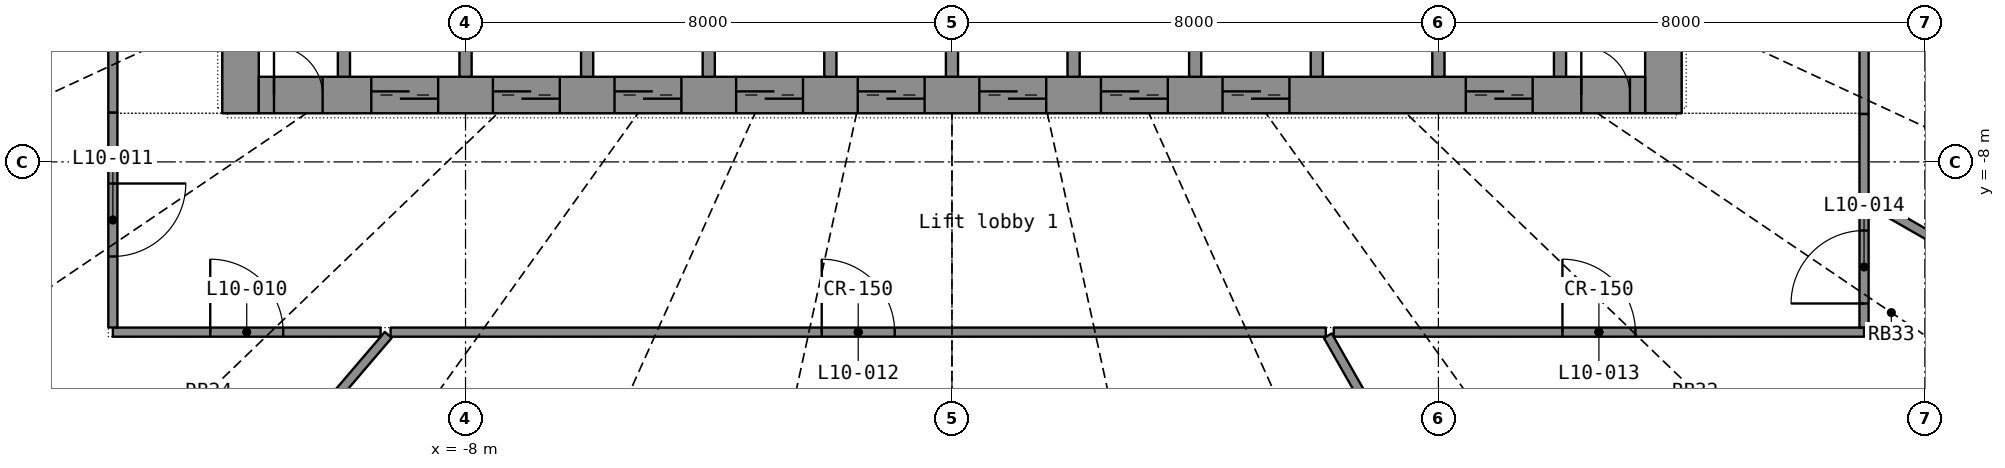
"""IFC4 building model, lengths in metres.
Left out: names, types, materials, properties, quantities, classifications, styles, units other than length and angle.
Written with IfcOpenShell. Run it as: python <this file> out.ifc"""

import sys

from ifc_helpers import new_model, si_unit, direction, frame, frame_2d, origin, place, context, subcontext, project, spatial, rectangle, extrude, element, fill, save


model = new_model("IFC4")
c1 = context("Model", 3, precision=1e-05, world=origin(), true_north=direction((0.0, 1.0)))
c2 = subcontext(c1, "Body", "Model", "MODEL_VIEW")
j1 = project(units=[si_unit("LENGTHUNIT", "METRE"), si_unit("PLANEANGLEUNIT", "RADIAN")], contexts=[c1])
p1 = place(None, origin())
s1 = spatial("IfcSite", under=j1, at=p1, CompositionType="ELEMENT")
p2 = place(p1, origin())
s2 = spatial("IfcBuilding", under=s1, at=p2, CompositionType="ELEMENT")
p3 = place(p2, frame((0.0, 0.0, 48.2)))
s3 = spatial("IfcBuildingStorey", under=s2, at=p3, CompositionType="ELEMENT", Elevation=48.2)
p4 = place(p3, frame((-11.7, -7.2, 0.0), z_axis=(0.0, 0.0, 1.0), x_axis=(0.0, 1.0, 0.0)))
e1 = element("IfcWall", 1, at=p4, inside=s3, PredefinedType="SHEAR", context=c2, shape_type="SweptSolid", body=[
    extrude(rectangle(XDim=14.4, YDim=0.6, at=frame_2d((7.2, 0.0))), origin(), (0.0, 0.0, 1.0), 3.3),
])
p5 = place(p4, frame((6.5, 0.0, 0.0)))
e2 = element("IfcOpeningElement", 2, at=p5, cuts=e1, PredefinedType="OPENING", context=c2, shape_type="SweptSolid", body=[
    extrude(rectangle(XDim=1.4, YDim=2.2, at=frame_2d((0.7, 1.1))), frame((0.0, 0.31, 0.0), z_axis=(0.0, -1.0, 0.0), x_axis=(1.0, 0.0, 0.0)), (0.0, 0.0, 1.0), 0.62),
])
p6 = place(p3, frame((11.7, -7.2, 0.0), z_axis=(0.0, 0.0, 1.0), x_axis=(0.0, 1.0, 0.0)))
e3 = element("IfcWall", 3, at=p6, inside=s3, PredefinedType="SHEAR", context=c2, shape_type="SweptSolid", body=[
    extrude(rectangle(XDim=14.4, YDim=0.6, at=frame_2d((7.2, 0.0))), origin(), (0.0, 0.0, 1.0), 3.3),
])
p7 = place(p6, frame((6.5, 0.0, 0.0)))
e4 = element("IfcOpeningElement", 4, at=p7, cuts=e3, PredefinedType="OPENING", context=c2, shape_type="SweptSolid", body=[
    extrude(rectangle(XDim=1.4, YDim=2.2, at=frame_2d((0.7, 1.1))), frame((0.0, 0.31, 0.0), z_axis=(0.0, -1.0, 0.0), x_axis=(1.0, 0.0, 0.0)), (0.0, 0.0, 1.0), 0.62),
])
p8 = place(p3, frame((-11.4, -6.9, 0.0), z_axis=(0.0, 0.0, 1.0), x_axis=(1.0, 0.0, 0.0)))
e5 = element("IfcWall", 5, at=p8, inside=s3, PredefinedType="SHEAR", context=c2, shape_type="SweptSolid", body=[
    extrude(rectangle(XDim=22.8, YDim=0.6, at=frame_2d((11.4, 0.0))), origin(), (0.0, 0.0, 1.0), 3.3),
])
p9 = place(p8, frame((1.85, 0.0, 0.0)))
e6 = element("IfcOpeningElement", 6, at=p9, cuts=e5, PredefinedType="OPENING", context=c2, shape_type="SweptSolid", body=[
    extrude(rectangle(XDim=1.1, YDim=2.2, at=frame_2d((0.55, 1.1))), frame((0.0, 0.31, 0.0), z_axis=(0.0, -1.0, 0.0), x_axis=(1.0, 0.0, 0.0)), (0.0, 0.0, 1.0), 0.62),
])
p10 = place(p8, frame((3.85, 0.0, 0.0)))
e7 = element("IfcOpeningElement", 7, at=p10, cuts=e5, PredefinedType="OPENING", context=c2, shape_type="SweptSolid", body=[
    extrude(rectangle(XDim=1.1, YDim=2.2, at=frame_2d((0.55, 1.1))), frame((0.0, 0.31, 0.0), z_axis=(0.0, -1.0, 0.0), x_axis=(1.0, 0.0, 0.0)), (0.0, 0.0, 1.0), 0.62),
])
p11 = place(p8, frame((5.85, 0.0, 0.0)))
e8 = element("IfcOpeningElement", 8, at=p11, cuts=e5, PredefinedType="OPENING", context=c2, shape_type="SweptSolid", body=[
    extrude(rectangle(XDim=1.1, YDim=2.2, at=frame_2d((0.55, 1.1))), frame((0.0, 0.31, 0.0), z_axis=(0.0, -1.0, 0.0), x_axis=(1.0, 0.0, 0.0)), (0.0, 0.0, 1.0), 0.62),
])
p12 = place(p8, frame((7.85, 0.0, 0.0)))
e9 = element("IfcOpeningElement", 9, at=p12, cuts=e5, PredefinedType="OPENING", context=c2, shape_type="SweptSolid", body=[
    extrude(rectangle(XDim=1.1, YDim=2.2, at=frame_2d((0.55, 1.1))), frame((0.0, 0.31, 0.0), z_axis=(0.0, -1.0, 0.0), x_axis=(1.0, 0.0, 0.0)), (0.0, 0.0, 1.0), 0.62),
])
p13 = place(p8, frame((9.85, 0.0, 0.0)))
e10 = element("IfcOpeningElement", 10, at=p13, cuts=e5, PredefinedType="OPENING", context=c2, shape_type="SweptSolid", body=[
    extrude(rectangle(XDim=1.1, YDim=2.2, at=frame_2d((0.55, 1.1))), frame((0.0, 0.31, 0.0), z_axis=(0.0, -1.0, 0.0), x_axis=(1.0, 0.0, 0.0)), (0.0, 0.0, 1.0), 0.62),
])
p14 = place(p8, frame((11.85, 0.0, 0.0)))
e11 = element("IfcOpeningElement", 11, at=p14, cuts=e5, PredefinedType="OPENING", context=c2, shape_type="SweptSolid", body=[
    extrude(rectangle(XDim=1.1, YDim=2.2, at=frame_2d((0.55, 1.1))), frame((0.0, 0.31, 0.0), z_axis=(0.0, -1.0, 0.0), x_axis=(1.0, 0.0, 0.0)), (0.0, 0.0, 1.0), 0.62),
])
p15 = place(p8, frame((13.85, 0.0, 0.0)))
e12 = element("IfcOpeningElement", 12, at=p15, cuts=e5, PredefinedType="OPENING", context=c2, shape_type="SweptSolid", body=[
    extrude(rectangle(XDim=1.1, YDim=2.2, at=frame_2d((0.55, 1.1))), frame((0.0, 0.31, 0.0), z_axis=(0.0, -1.0, 0.0), x_axis=(1.0, 0.0, 0.0)), (0.0, 0.0, 1.0), 0.62),
])
p16 = place(p8, frame((15.85, 0.0, 0.0)))
e13 = element("IfcOpeningElement", 13, at=p16, cuts=e5, PredefinedType="OPENING", context=c2, shape_type="SweptSolid", body=[
    extrude(rectangle(XDim=1.1, YDim=2.2, at=frame_2d((0.55, 1.1))), frame((0.0, 0.31, 0.0), z_axis=(0.0, -1.0, 0.0), x_axis=(1.0, 0.0, 0.0)), (0.0, 0.0, 1.0), 0.62),
])
p17 = place(p8, frame((19.85, 0.0, 0.0)))
e14 = element("IfcOpeningElement", 14, at=p17, cuts=e5, PredefinedType="OPENING", context=c2, shape_type="SweptSolid", body=[
    extrude(rectangle(XDim=1.1, YDim=2.2, at=frame_2d((0.55, 1.1))), frame((0.0, 0.31, 0.0), z_axis=(0.0, -1.0, 0.0), x_axis=(1.0, 0.0, 0.0)), (0.0, 0.0, 1.0), 0.62),
])
p18 = place(p8, frame((0.25, 0.0, 0.0)))
e15 = element("IfcOpeningElement", 15, at=p18, cuts=e5, PredefinedType="OPENING", context=c2, shape_type="SweptSolid", body=[
    extrude(rectangle(XDim=0.8, YDim=2.05, at=frame_2d((0.4, 1.025))), frame((0.0, 0.31, 0.0), z_axis=(0.0, -1.0, 0.0), x_axis=(1.0, 0.0, 0.0)), (0.0, 0.0, 1.0), 0.62),
])
p19 = place(p8, frame((21.75, 0.0, 0.0)))
e16 = element("IfcOpeningElement", 16, at=p19, cuts=e5, PredefinedType="OPENING", context=c2, shape_type="SweptSolid", body=[
    extrude(rectangle(XDim=0.8, YDim=2.05, at=frame_2d((0.4, 1.025))), frame((0.0, 0.31, 0.0), z_axis=(0.0, -1.0, 0.0), x_axis=(1.0, 0.0, 0.0)), (0.0, 0.0, 1.0), 0.62),
])
for number, where, z_axis, x_axis in (
    (17, (-10.0, -6.6, 0.0), (0.0, 0.0, 1.0), (0.0, 1.0, 0.0)),
    (18, (-8.0, -6.6, 0.0), (0.0, 0.0, 1.0), (0.0, 1.0, 0.0)),
    (19, (-6.0, -6.6, 0.0), (0.0, 0.0, 1.0), (0.0, 1.0, 0.0)),
    (20, (-4.0, -6.6, 0.0), (0.0, 0.0, 1.0), (0.0, 1.0, 0.0)),
    (21, (-2.0, -6.6, 0.0), (0.0, 0.0, 1.0), (0.0, 1.0, 0.0)),
    (22, (0.0, -6.6, 0.0), (0.0, 0.0, 1.0), (0.0, 1.0, 0.0)),
    (23, (2.0, -6.6, 0.0), (0.0, 0.0, 1.0), (0.0, 1.0, 0.0)),
    (24, (4.0, -6.6, 0.0), (0.0, 0.0, 1.0), (0.0, 1.0, 0.0)),
    (25, (6.0, -6.6, 0.0), (0.0, 0.0, 1.0), (0.0, 1.0, 0.0)),
    (26, (8.0, -6.6, 0.0), (0.0, 0.0, 1.0), (0.0, 1.0, 0.0)),
    (27, (10.0, -6.6, 0.0), (0.0, 0.0, 1.0), (0.0, 1.0, 0.0)),
):
    element("IfcWall", number, at=place(p3, frame(where, z_axis=z_axis, x_axis=x_axis)), inside=s3, PredefinedType="SHEAR", context=c2, shape_type="SweptSolid", body=[
        extrude(rectangle(XDim=2.7, YDim=0.2, at=frame_2d((1.35, 0.0))), origin(), (0.0, 0.0, 1.0), 3.3),
    ])
p20 = place(p3, frame((-9.232, -10.8, 0.0), z_axis=(0.0, 0.0, 1.0), x_axis=(1.0, 0.0, 0.0)))
e28 = element("IfcWall", 28, at=p20, inside=s3, PredefinedType="PARTITIONING", context=c2, shape_type="SweptSolid", body=[
    extrude(rectangle(XDim=15.381, YDim=0.15, at=frame_2d((7.69, 0.0))), origin(), (0.0, 0.0, 1.0), 2.4),
])
p21 = place(p20, frame((7.09, 0.0, 0.0)))
e29 = element("IfcOpeningElement", 29, at=p21, cuts=e28, PredefinedType="OPENING", context=c2, shape_type="SweptSolid", body=[
    extrude(rectangle(XDim=1.2, YDim=2.2, at=frame_2d((0.6, 1.1))), frame((0.0, 0.085, 0.0), z_axis=(0.0, -1.0, 0.0), x_axis=(1.0, 0.0, 0.0)), (0.0, 0.0, 1.0), 0.17),
])
p22 = place(p3, frame((-24.974, -9.539, 0.0), z_axis=(0.0, 0.0, 1.0), x_axis=(0.934173736, 0.356818485, 0.0)))
e30 = element("IfcWall", 30, at=p22, inside=s3, PredefinedType="PARTITIONING", context=c2, shape_type="SweptSolid", body=[
    extrude(rectangle(XDim=11.961, YDim=0.15, at=frame_2d((5.981, 0.0))), origin(), (0.0, 0.0, 1.0), 2.4),
])
p23 = place(p3, frame((11.639, -20.445, 0.0), z_axis=(0.0, 0.0, 1.0), x_axis=(-0.494739272, 0.869041456, 0.0)))
e31 = element("IfcWall", 31, at=p23, inside=s3, PredefinedType="PARTITIONING", context=c2, shape_type="SweptSolid", body=[
    extrude(rectangle(XDim=11.031, YDim=0.15, at=frame_2d((5.516, 0.0))), origin(), (0.0, 0.0, 1.0), 2.4),
])
p24 = place(p3, frame((-15.798, -18.48, 0.0), z_axis=(0.0, 0.0, 1.0), x_axis=(0.649794059, 0.760110308, 0.0)))
e32 = element("IfcWall", 32, at=p24, inside=s3, PredefinedType="PARTITIONING", context=c2, shape_type="SweptSolid", body=[
    extrude(rectangle(XDim=10.045, YDim=0.15, at=frame_2d((5.022, 0.0))), origin(), (0.0, 0.0, 1.0), 2.4),
])
p25 = place(p3, frame((6.279, -10.8, 0.0), z_axis=(0.0, 0.0, 1.0), x_axis=(1.0, 0.0, 0.0)))
e33 = element("IfcWall", 33, at=p25, inside=s3, PredefinedType="PARTITIONING", context=c2, shape_type="SweptSolid", body=[
    extrude(rectangle(XDim=8.721, YDim=0.15, at=frame_2d((4.36, 0.0))), origin(), (0.0, 0.0, 1.0), 2.4),
])
p26 = place(p25, frame((3.76, 0.0, 0.0)))
e34 = element("IfcOpeningElement", 34, at=p26, cuts=e33, PredefinedType="OPENING", context=c2, shape_type="SweptSolid", body=[
    extrude(rectangle(XDim=1.2, YDim=2.2, at=frame_2d((0.6, 1.1))), frame((0.0, 0.085, 0.0), z_axis=(0.0, -1.0, 0.0), x_axis=(1.0, 0.0, 0.0)), (0.0, 0.0, 1.0), 0.17),
])
p27 = place(p3, frame((22.571, -12.945, 0.0), z_axis=(0.0, 0.0, 1.0), x_axis=(-0.867458802, 0.497509022, 0.0)))
e35 = element("IfcWall", 35, at=p27, inside=s3, PredefinedType="PARTITIONING", context=c2, shape_type="SweptSolid", body=[
    extrude(rectangle(XDim=8.728, YDim=0.15, at=frame_2d((4.364, 0.0))), origin(), (0.0, 0.0, 1.0), 2.4),
])
p28 = place(p3, frame((15.0, -7.212, 0.0), z_axis=(0.0, 0.0, 1.0), x_axis=(0.0, 1.0, 0.0)))
e36 = element("IfcWall", 36, at=p28, inside=s3, PredefinedType="PARTITIONING", context=c2, shape_type="SweptSolid", body=[
    extrude(rectangle(XDim=6.054, YDim=0.15, at=frame_2d((3.027, 0.0))), origin(), (0.0, 0.0, 1.0), 2.4),
])
p29 = place(p28, frame((2.427, 0.0, 0.0)))
e37 = element("IfcOpeningElement", 37, at=p29, cuts=e36, PredefinedType="OPENING", context=c2, shape_type="SweptSolid", body=[
    extrude(rectangle(XDim=1.2, YDim=2.2, at=frame_2d((0.6, 1.1))), frame((0.0, 0.085, 0.0), z_axis=(0.0, -1.0, 0.0), x_axis=(1.0, 0.0, 0.0)), (0.0, 0.0, 1.0), 0.17),
])
p30 = place(p3, frame((-13.8, -10.8, 0.0), z_axis=(0.0, 0.0, 1.0), x_axis=(1.0, 0.0, 0.0)))
e38 = element("IfcWall", 38, at=p30, inside=s3, PredefinedType="PARTITIONING", context=c2, shape_type="SweptSolid", body=[
    extrude(rectangle(XDim=4.403, YDim=0.15, at=frame_2d((2.202, 0.0))), origin(), (0.0, 0.0, 1.0), 2.4),
])
p31 = place(p30, frame((1.602, 0.0, 0.0)))
e39 = element("IfcOpeningElement", 39, at=p31, cuts=e38, PredefinedType="OPENING", context=c2, shape_type="SweptSolid", body=[
    extrude(rectangle(XDim=1.2, YDim=2.2, at=frame_2d((0.6, 1.1))), frame((0.0, 0.085, 0.0), z_axis=(0.0, -1.0, 0.0), x_axis=(1.0, 0.0, 0.0)), (0.0, 0.0, 1.0), 0.17),
])
p32 = place(p3, frame((-13.8, -7.188, 0.0), z_axis=(0.0, 0.0, 1.0), x_axis=(0.0, -1.0, 0.0)))
e40 = element("IfcWall", 40, at=p32, inside=s3, PredefinedType="PARTITIONING", context=c2, shape_type="SweptSolid", body=[
    extrude(rectangle(XDim=3.535, YDim=0.15, at=frame_2d((1.768, 0.0))), origin(), (0.0, 0.0, 1.0), 2.4),
])
p33 = place(p32, frame((1.167, 0.0, 0.0)))
e41 = element("IfcOpeningElement", 41, at=p33, cuts=e40, PredefinedType="OPENING", context=c2, shape_type="SweptSolid", body=[
    extrude(rectangle(XDim=1.2, YDim=2.2, at=frame_2d((0.6, 1.1))), frame((0.0, 0.085, 0.0), z_axis=(0.0, -1.0, 0.0), x_axis=(1.0, 0.0, 0.0)), (0.0, 0.0, 1.0), 0.17),
])
p34 = place(p3, frame((15.0, -10.723, 0.0), z_axis=(0.0, 0.0, 1.0), x_axis=(0.0, 1.0, 0.0)))
e42 = element("IfcWall", 42, at=p34, inside=s3, PredefinedType="PARTITIONING", context=c2, shape_type="SweptSolid", body=[
    extrude(rectangle(XDim=1.988, YDim=0.15, at=frame_2d((0.994, 0.0))), origin(), (0.0, 0.0, 1.0), 2.4),
])
p35 = place(p34, frame((0.394, 0.0, 0.0)))
e43 = element("IfcOpeningElement", 43, at=p35, cuts=e42, PredefinedType="OPENING", context=c2, shape_type="SweptSolid", body=[
    extrude(rectangle(XDim=1.2, YDim=2.2, at=frame_2d((0.6, 1.1))), frame((0.0, 0.085, 0.0), z_axis=(0.0, -1.0, 0.0), x_axis=(1.0, 0.0, 0.0)), (0.0, 0.0, 1.0), 0.17),
])
p36 = place(p3, frame((-13.8, -5.382, 0.0), z_axis=(0.0, 0.0, 1.0), x_axis=(0.0, -1.0, 0.0)))
e44 = element("IfcWall", 44, at=p36, inside=s3, PredefinedType="PARTITIONING", context=c2, shape_type="SweptSolid", body=[
    extrude(rectangle(XDim=1.805, YDim=0.15, at=frame_2d((0.902, 0.0))), origin(), (0.0, 0.0, 1.0), 2.4),
])
p37 = place(p3, frame((15.0, -8.536, 0.0), z_axis=(0.0, 0.0, 1.0), x_axis=(0.0, 1.0, 0.0)))
e45 = element("IfcWall", 45, at=p37, inside=s3, PredefinedType="PARTITIONING", context=c2, shape_type="SweptSolid", body=[
    extrude(rectangle(XDim=1.323, YDim=0.15, at=frame_2d((0.662, 0.0))), origin(), (0.0, 0.0, 1.0), 2.4),
])
p38 = place(p9, origin())
e46 = element("IfcDoor", 46, at=p38, inside=s3, OperationType="DOUBLE_DOOR_SLIDING", PredefinedType="DOOR", context=c2, shape_type="SweptSolid", body=[
    extrude(rectangle(XDim=1.1, YDim=2.2, at=frame_2d((0.55, 1.1))), frame((0.0, 0.025, 0.0), z_axis=(0.0, -1.0, 0.0), x_axis=(1.0, 0.0, 0.0)), (0.0, 0.0, 1.0), 0.05),
])
fill(e6, e46)
p39 = place(p10, origin())
e47 = element("IfcDoor", 47, at=p39, inside=s3, OperationType="DOUBLE_DOOR_SLIDING", PredefinedType="DOOR", context=c2, shape_type="SweptSolid", body=[
    extrude(rectangle(XDim=1.1, YDim=2.2, at=frame_2d((0.55, 1.1))), frame((0.0, 0.025, 0.0), z_axis=(0.0, -1.0, 0.0), x_axis=(1.0, 0.0, 0.0)), (0.0, 0.0, 1.0), 0.05),
])
fill(e7, e47)
p40 = place(p11, origin())
e48 = element("IfcDoor", 48, at=p40, inside=s3, OperationType="DOUBLE_DOOR_SLIDING", PredefinedType="DOOR", context=c2, shape_type="SweptSolid", body=[
    extrude(rectangle(XDim=1.1, YDim=2.2, at=frame_2d((0.55, 1.1))), frame((0.0, 0.025, 0.0), z_axis=(0.0, -1.0, 0.0), x_axis=(1.0, 0.0, 0.0)), (0.0, 0.0, 1.0), 0.05),
])
fill(e8, e48)
p41 = place(p12, origin())
e49 = element("IfcDoor", 49, at=p41, inside=s3, OperationType="DOUBLE_DOOR_SLIDING", PredefinedType="DOOR", context=c2, shape_type="SweptSolid", body=[
    extrude(rectangle(XDim=1.1, YDim=2.2, at=frame_2d((0.55, 1.1))), frame((0.0, 0.025, 0.0), z_axis=(0.0, -1.0, 0.0), x_axis=(1.0, 0.0, 0.0)), (0.0, 0.0, 1.0), 0.05),
])
fill(e9, e49)
p42 = place(p13, origin())
e50 = element("IfcDoor", 50, at=p42, inside=s3, OperationType="DOUBLE_DOOR_SLIDING", PredefinedType="DOOR", context=c2, shape_type="SweptSolid", body=[
    extrude(rectangle(XDim=1.1, YDim=2.2, at=frame_2d((0.55, 1.1))), frame((0.0, 0.025, 0.0), z_axis=(0.0, -1.0, 0.0), x_axis=(1.0, 0.0, 0.0)), (0.0, 0.0, 1.0), 0.05),
])
fill(e10, e50)
p43 = place(p14, origin())
e51 = element("IfcDoor", 51, at=p43, inside=s3, OperationType="DOUBLE_DOOR_SLIDING", PredefinedType="DOOR", context=c2, shape_type="SweptSolid", body=[
    extrude(rectangle(XDim=1.1, YDim=2.2, at=frame_2d((0.55, 1.1))), frame((0.0, 0.025, 0.0), z_axis=(0.0, -1.0, 0.0), x_axis=(1.0, 0.0, 0.0)), (0.0, 0.0, 1.0), 0.05),
])
fill(e11, e51)
p44 = place(p15, origin())
e52 = element("IfcDoor", 52, at=p44, inside=s3, OperationType="DOUBLE_DOOR_SLIDING", PredefinedType="DOOR", context=c2, shape_type="SweptSolid", body=[
    extrude(rectangle(XDim=1.1, YDim=2.2, at=frame_2d((0.55, 1.1))), frame((0.0, 0.025, 0.0), z_axis=(0.0, -1.0, 0.0), x_axis=(1.0, 0.0, 0.0)), (0.0, 0.0, 1.0), 0.05),
])
fill(e12, e52)
p45 = place(p16, origin())
e53 = element("IfcDoor", 53, at=p45, inside=s3, OperationType="DOUBLE_DOOR_SLIDING", PredefinedType="DOOR", context=c2, shape_type="SweptSolid", body=[
    extrude(rectangle(XDim=1.1, YDim=2.2, at=frame_2d((0.55, 1.1))), frame((0.0, 0.025, 0.0), z_axis=(0.0, -1.0, 0.0), x_axis=(1.0, 0.0, 0.0)), (0.0, 0.0, 1.0), 0.05),
])
fill(e13, e53)
p46 = place(p17, origin())
e54 = element("IfcDoor", 54, at=p46, inside=s3, OperationType="DOUBLE_DOOR_SLIDING", PredefinedType="DOOR", context=c2, shape_type="SweptSolid", body=[
    extrude(rectangle(XDim=1.1, YDim=2.2, at=frame_2d((0.55, 1.1))), frame((0.0, 0.025, 0.0), z_axis=(0.0, -1.0, 0.0), x_axis=(1.0, 0.0, 0.0)), (0.0, 0.0, 1.0), 0.05),
])
fill(e14, e54)
p47 = place(p18, origin())
e55 = element("IfcDoor", 55, at=p47, inside=s3, OperationType="SINGLE_SWING_LEFT", PredefinedType="DOOR", context=c2, shape_type="SweptSolid", body=[
    extrude(rectangle(XDim=0.8, YDim=2.05, at=frame_2d((0.4, 1.025))), frame((0.0, 0.025, 0.0), z_axis=(0.0, -1.0, 0.0), x_axis=(1.0, 0.0, 0.0)), (0.0, 0.0, 1.0), 0.05),
])
fill(e15, e55)
p48 = place(p19, origin())
e56 = element("IfcDoor", 56, at=p48, inside=s3, OperationType="SINGLE_SWING_LEFT", PredefinedType="DOOR", context=c2, shape_type="SweptSolid", body=[
    extrude(rectangle(XDim=0.8, YDim=2.05, at=frame_2d((0.4, 1.025))), frame((0.0, 0.025, 0.0), z_axis=(0.0, -1.0, 0.0), x_axis=(1.0, 0.0, 0.0)), (0.0, 0.0, 1.0), 0.05),
])
fill(e16, e56)
p49 = place(p31, origin())
e57 = element("IfcDoor", 57, at=p49, inside=s3, OperationType="DOUBLE_DOOR_SINGLE_SWING", PredefinedType="DOOR", context=c2, shape_type="SweptSolid", body=[
    extrude(rectangle(XDim=1.2, YDim=2.2, at=frame_2d((0.6, 1.1))), frame((0.0, 0.025, 0.0), z_axis=(0.0, -1.0, 0.0), x_axis=(1.0, 0.0, 0.0)), (0.0, 0.0, 1.0), 0.05),
])
fill(e39, e57)
p50 = place(p33, origin())
e58 = element("IfcDoor", 58, at=p50, inside=s3, OperationType="DOUBLE_DOOR_SINGLE_SWING", PredefinedType="DOOR", context=c2, shape_type="SweptSolid", body=[
    extrude(rectangle(XDim=1.2, YDim=2.2, at=frame_2d((0.6, 1.1))), frame((0.0, 0.025, 0.0), z_axis=(0.0, -1.0, 0.0), x_axis=(1.0, 0.0, 0.0)), (0.0, 0.0, 1.0), 0.05),
])
fill(e41, e58)
p51 = place(p21, origin())
e59 = element("IfcDoor", 59, at=p51, inside=s3, OperationType="DOUBLE_DOOR_SINGLE_SWING", PredefinedType="DOOR", context=c2, shape_type="SweptSolid", body=[
    extrude(rectangle(XDim=1.2, YDim=2.2, at=frame_2d((0.6, 1.1))), frame((0.0, 0.025, 0.0), z_axis=(0.0, -1.0, 0.0), x_axis=(1.0, 0.0, 0.0)), (0.0, 0.0, 1.0), 0.05),
])
fill(e29, e59)
p52 = place(p26, origin())
e60 = element("IfcDoor", 60, at=p52, inside=s3, OperationType="DOUBLE_DOOR_SINGLE_SWING", PredefinedType="DOOR", context=c2, shape_type="SweptSolid", body=[
    extrude(rectangle(XDim=1.2, YDim=2.2, at=frame_2d((0.6, 1.1))), frame((0.0, 0.025, 0.0), z_axis=(0.0, -1.0, 0.0), x_axis=(1.0, 0.0, 0.0)), (0.0, 0.0, 1.0), 0.05),
])
fill(e34, e60)
p53 = place(p35, origin())
e61 = element("IfcDoor", 61, at=p53, inside=s3, OperationType="DOUBLE_DOOR_SINGLE_SWING", PredefinedType="DOOR", context=c2, shape_type="SweptSolid", body=[
    extrude(rectangle(XDim=1.2, YDim=2.2, at=frame_2d((0.6, 1.1))), frame((0.0, 0.025, 0.0), z_axis=(0.0, -1.0, 0.0), x_axis=(1.0, 0.0, 0.0)), (0.0, 0.0, 1.0), 0.05),
])
fill(e43, e61)
save(model, sys.argv[1])
